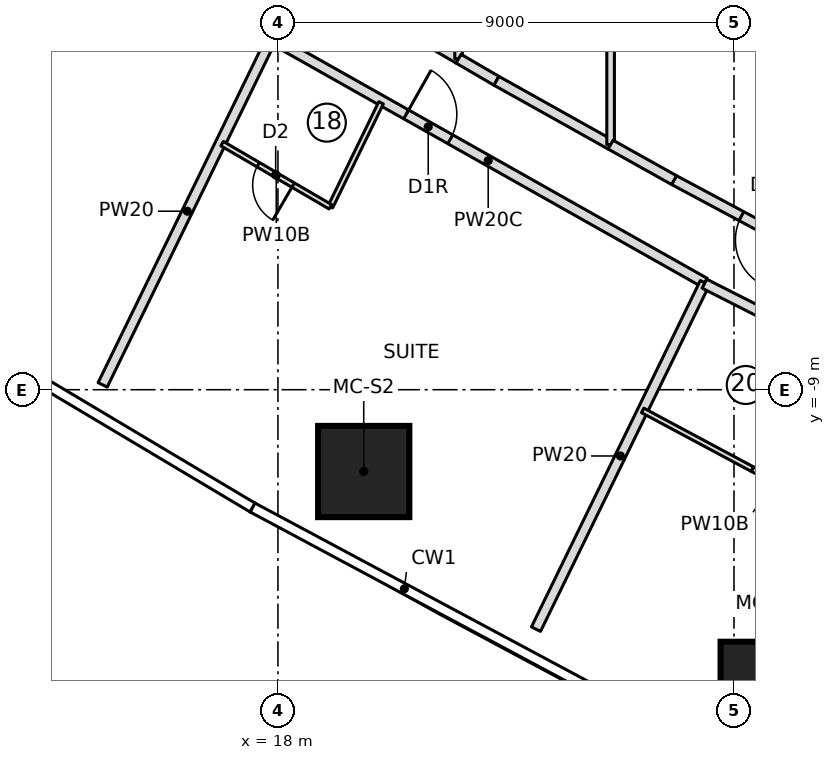
"""IFC4 building model, lengths in metres.
Left out: names, types, materials, properties, quantities, classifications, styles, units other than length and angle.
Written with IfcOpenShell. Run it as: python <this file> out.ifc"""

import sys

from ifc_helpers import new_model, si_unit, direction, frame, frame_2d, origin, origin_2d, place, context, subcontext, project, spatial, rectangle, extrude, element, fill, save


model = new_model("IFC4")
c1 = context("Model", 3, precision=1e-05, world=origin(), true_north=direction((0.0, 1.0)))
c2 = subcontext(c1, "Body", "Model", "MODEL_VIEW")
j1 = project(units=[si_unit("LENGTHUNIT", "METRE"), si_unit("PLANEANGLEUNIT", "RADIAN")], contexts=[c1])
p1 = place(None, origin())
s1 = spatial("IfcSite", under=j1, at=p1, CompositionType="ELEMENT")
p2 = place(p1, origin())
s2 = spatial("IfcBuilding", under=s1, at=p2, CompositionType="ELEMENT")
p3 = place(p2, frame((0.0, 0.0, 64.45)))
s3 = spatial("IfcBuildingStorey", under=s2, at=p3, CompositionType="ELEMENT", Elevation=64.45)
for number, where, z_axis, x_axis in (
    (1, (19.693, -10.615, 0.0), (0.0, 0.0, 1.0), (1.0, 0.0, 0.0)),
    (2, (27.635, -14.874, 0.0), (0.0, 0.0, 1.0), (1.0, 0.0, 0.0)),
):
    element("IfcColumn", number, at=place(p3, frame(where, z_axis=z_axis, x_axis=x_axis)), inside=s3, PredefinedType="COLUMN", context=c2, shape_type="SweptSolid", body=[
        extrude(rectangle(XDim=1.8, YDim=1.8, at=origin_2d()), origin(), (0.0, 0.0, 1.0), 3.55),
    ])
p4 = place(p3, frame((14.541, -8.904, 0.0), z_axis=(0.0, 0.0, 1.0), x_axis=(0.438213564788, 0.898870887078, 0.0)))
e3 = element("IfcWall", 3, at=p4, inside=s3, PredefinedType="PARTITIONING", context=c2, shape_type="SweptSolid", body=[
    extrude(rectangle(XDim=7.625, YDim=0.2, at=frame_2d((3.813, 0.0))), origin(), (0.0, 0.0, 1.0), 3.25),
])
p5 = place(p3, frame((17.874, -2.068, 0.0), z_axis=(0.0, 0.0, 1.0), x_axis=(0.871078318876, -0.491144136057, 0.0)))
e4 = element("IfcWall", 4, at=p5, inside=s3, PredefinedType="PARTITIONING", context=c2, shape_type="SweptSolid", body=[
    extrude(rectangle(XDim=9.817, YDim=0.2, at=frame_2d((4.909, 0.0))), origin(), (0.0, 0.0, 1.0), 3.25),
])
p6 = place(p5, frame((3.05, 0.0, 0.0)))
e5 = element("IfcOpeningElement", 5, at=p6, cuts=e4, PredefinedType="OPENING", context=c2, shape_type="SweptSolid", body=[
    extrude(rectangle(XDim=1.0, YDim=2.1, at=frame_2d((0.5, 1.05))), frame((0.0, 0.11, 0.0), z_axis=(0.0, -1.0, 0.0), x_axis=(1.0, 0.0, 0.0)), (0.0, 0.0, 1.0), 0.22),
])
p7 = place(p3, frame((20.035, -3.338, 0.0), z_axis=(0.0, 0.0, 1.0), x_axis=(-0.438122322582, -0.898915363344, 0.0)))
e6 = element("IfcWall", 6, at=p7, inside=s3, PredefinedType="PARTITIONING", context=c2, shape_type="SweptSolid", body=[
    extrude(rectangle(XDim=2.283, YDim=0.1, at=frame_2d((1.142, 0.0))), origin(), (0.0, 0.0, 1.0), 3.25),
])
p8 = place(p3, frame((19.035, -5.39, 0.0), z_axis=(0.0, 0.0, 1.0), x_axis=(-0.863707305865, 0.503993739837, 0.0)))
e7 = element("IfcWall", 7, at=p8, inside=s3, PredefinedType="PARTITIONING", context=c2, shape_type="SweptSolid", body=[
    extrude(rectangle(XDim=2.474, YDim=0.1, at=frame_2d((1.237, 0.0))), origin(), (0.0, 0.0, 1.0), 3.25),
])
p9 = place(p8, frame((0.85, 0.0, 0.0)))
e8 = element("IfcOpeningElement", 8, at=p9, cuts=e7, PredefinedType="OPENING", context=c2, shape_type="SweptSolid", body=[
    extrude(rectangle(XDim=0.8, YDim=2.1, at=frame_2d((0.4, 1.05))), frame((0.0, 0.06, 0.0), z_axis=(0.0, -1.0, 0.0), x_axis=(1.0, 0.0, 0.0)), (0.0, 0.0, 1.0), 0.12),
])
p10 = place(p3, frame((23.093, -13.726, 0.0), z_axis=(0.0, 0.0, 1.0), x_axis=(0.438202895602, 0.898876088394, 0.0)))
e9 = element("IfcWall", 9, at=p10, inside=s3, PredefinedType="PARTITIONING", context=c2, shape_type="SweptSolid", body=[
    extrude(rectangle(XDim=7.605, YDim=0.2, at=frame_2d((3.803, 0.0))), origin(), (0.0, 0.0, 1.0), 3.25),
])
p11 = place(p3, frame((26.417, -6.908, 0.0), z_axis=(0.0, 0.0, 1.0), x_axis=(0.891700643128, -0.452625632334, 0.0)))
e10 = element("IfcWall", 10, at=p11, inside=s3, PredefinedType="PARTITIONING", context=c2, shape_type="SweptSolid", body=[
    extrude(rectangle(XDim=9.801, YDim=0.2, at=frame_2d((4.901, 0.0))), origin(), (0.0, 0.0, 1.0), 3.25),
])
p12 = place(p11, frame((3.7, 0.0, 0.0)))
e11 = element("IfcOpeningElement", 11, at=p12, cuts=e10, PredefinedType="OPENING", context=c2, shape_type="SweptSolid", body=[
    extrude(rectangle(XDim=1.0, YDim=2.1, at=frame_2d((0.5, 1.05))), frame((0.0, 0.11, 0.0), z_axis=(0.0, -1.0, 0.0), x_axis=(1.0, 0.0, 0.0)), (0.0, 0.0, 1.0), 0.22),
])
p13 = place(p3, frame((28.027, -10.907, 0.0), z_axis=(0.0, 0.0, 1.0), x_axis=(-0.890195653003, 0.455578422858, 0.0)))
e12 = element("IfcWall", 12, at=p13, inside=s3, PredefinedType="PARTITIONING", context=c2, shape_type="SweptSolid", body=[
    extrude(rectangle(XDim=0.745, YDim=0.1, at=frame_2d((0.373, 0.0))), origin(), (0.0, 0.0, 1.0), 3.25),
])
p14 = place(p3, frame((27.363, -10.568, 0.0), z_axis=(0.0, 0.0, 1.0), x_axis=(-0.881658684569, 0.471887660279, 0.0)))
e13 = element("IfcWall", 13, at=p14, inside=s3, PredefinedType="PARTITIONING", context=c2, shape_type="SweptSolid", body=[
    extrude(rectangle(XDim=2.457, YDim=0.1, at=frame_2d((1.228, 0.0))), origin(), (0.0, 0.0, 1.0), 3.25),
])
p15 = place(p3, frame((21.565, -2.467, 0.0), z_axis=(0.0, 0.0, 1.0), x_axis=(-0.86371145221, 0.503986634071, 0.0)))
e14 = element("IfcWall", 14, at=p15, inside=s3, PredefinedType="PARTITIONING", context=c2, shape_type="SweptSolid", body=[
    extrude(rectangle(XDim=3.151, YDim=0.2, at=frame_2d((1.576, 0.0))), origin(), (0.0, 0.0, 1.0), 3.25),
])
p16 = place(p3, frame((21.565, -2.467, 0.0), z_axis=(0.0, 0.0, 1.0), x_axis=(0.0, 1.0, 0.0)))
e15 = element("IfcWall", 15, at=p16, inside=s3, PredefinedType="PARTITIONING", context=c2, shape_type="SweptSolid", body=[
    extrude(rectangle(XDim=4.935, YDim=0.15, at=frame_2d((2.467, 0.0))), origin(), (0.0, 0.0, 1.0), 3.25),
])
p17 = place(p3, frame((22.312, -2.903, 0.0), z_axis=(0.0, 0.0, 1.0), x_axis=(-0.863707207562, 0.503993908303, 0.0)))
e16 = element("IfcWall", 16, at=p17, inside=s3, PredefinedType="PARTITIONING", context=c2, shape_type="SweptSolid", body=[
    extrude(rectangle(XDim=0.865, YDim=0.2, at=frame_2d((0.432, 0.0))), origin(), (0.0, 0.0, 1.0), 3.25),
])
p18 = place(p3, frame((24.565, -4.163, 0.0), z_axis=(0.0, 0.0, 1.0), x_axis=(-0.872797752414, 0.488082045748, 0.0)))
e17 = element("IfcWall", 17, at=p18, inside=s3, PredefinedType="PARTITIONING", context=c2, shape_type="SweptSolid", body=[
    extrude(rectangle(XDim=2.582, YDim=0.2, at=frame_2d((1.291, 0.0))), origin(), (0.0, 0.0, 1.0), 3.25),
])
p19 = place(p3, frame((24.565, -4.163, 0.0), z_axis=(0.0, 0.0, 1.0), x_axis=(0.0, 1.0, 0.0)))
e18 = element("IfcWall", 18, at=p19, inside=s3, PredefinedType="PARTITIONING", context=c2, shape_type="SweptSolid", body=[
    extrude(rectangle(XDim=8.326, YDim=0.15, at=frame_2d((4.163, 0.0))), origin(), (0.0, 0.0, 1.0), 3.25),
])
p20 = place(p3, frame((29.357, -6.758, 0.0), z_axis=(0.0, 0.0, 1.0), x_axis=(-0.881655245922, 0.471894084874, 0.0)))
e19 = element("IfcWall", 19, at=p20, inside=s3, PredefinedType="PARTITIONING", context=c2, shape_type="SweptSolid", body=[
    extrude(rectangle(XDim=4.016, YDim=0.2, at=frame_2d((2.008, 0.0))), origin(), (0.0, 0.0, 1.0), 3.25),
])
p21 = place(p20, frame((1.508, 0.0, 0.0)))
e20 = element("IfcOpeningElement", 20, at=p21, cuts=e19, PredefinedType="OPENING", context=c2, shape_type="SweptSolid", body=[
    extrude(rectangle(XDim=1.0, YDim=2.1, at=frame_2d((0.5, 1.05))), frame((0.0, 0.11, 0.0), z_axis=(0.0, -1.0, 0.0), x_axis=(1.0, 0.0, 0.0)), (0.0, 0.0, 1.0), 0.22),
])
p22 = place(p3, frame((25.817, -4.863, 0.0), z_axis=(0.0, 0.0, 1.0), x_axis=(-0.872804855849, 0.488069343031, 0.0)))
e21 = element("IfcWall", 21, at=p22, inside=s3, PredefinedType="PARTITIONING", context=c2, shape_type="SweptSolid", body=[
    extrude(rectangle(XDim=1.434, YDim=0.2, at=frame_2d((0.717, 0.0))), origin(), (0.0, 0.0, 1.0), 3.25),
])
p23 = place(p9, origin())
e22 = element("IfcDoor", 22, at=p23, inside=s3, OperationType="SINGLE_SWING_LEFT", PredefinedType="DOOR", context=c2, shape_type="SweptSolid", body=[
    extrude(rectangle(XDim=0.8, YDim=2.1, at=frame_2d((0.4, 1.05))), frame((0.0, 0.025, 0.0), z_axis=(0.0, -1.0, 0.0), x_axis=(1.0, 0.0, 0.0)), (0.0, 0.0, 1.0), 0.05),
])
fill(e8, e22)
p24 = place(p6, origin())
e23 = element("IfcDoor", 23, at=p24, inside=s3, OperationType="SINGLE_SWING_RIGHT", PredefinedType="DOOR", context=c2, shape_type="SweptSolid", body=[
    extrude(rectangle(XDim=1.0, YDim=2.1, at=frame_2d((0.5, 1.05))), frame((0.0, 0.025, 0.0), z_axis=(0.0, -1.0, 0.0), x_axis=(1.0, 0.0, 0.0)), (0.0, 0.0, 1.0), 0.05),
])
fill(e5, e23)
p25 = place(p21, origin())
e24 = element("IfcDoor", 24, at=p25, inside=s3, OperationType="SINGLE_SWING_LEFT", PredefinedType="DOOR", context=c2, shape_type="SweptSolid", body=[
    extrude(rectangle(XDim=1.0, YDim=2.1, at=frame_2d((0.5, 1.05))), frame((0.0, 0.025, 0.0), z_axis=(0.0, -1.0, 0.0), x_axis=(1.0, 0.0, 0.0)), (0.0, 0.0, 1.0), 0.05),
])
fill(e20, e24)
save(model, sys.argv[1])
